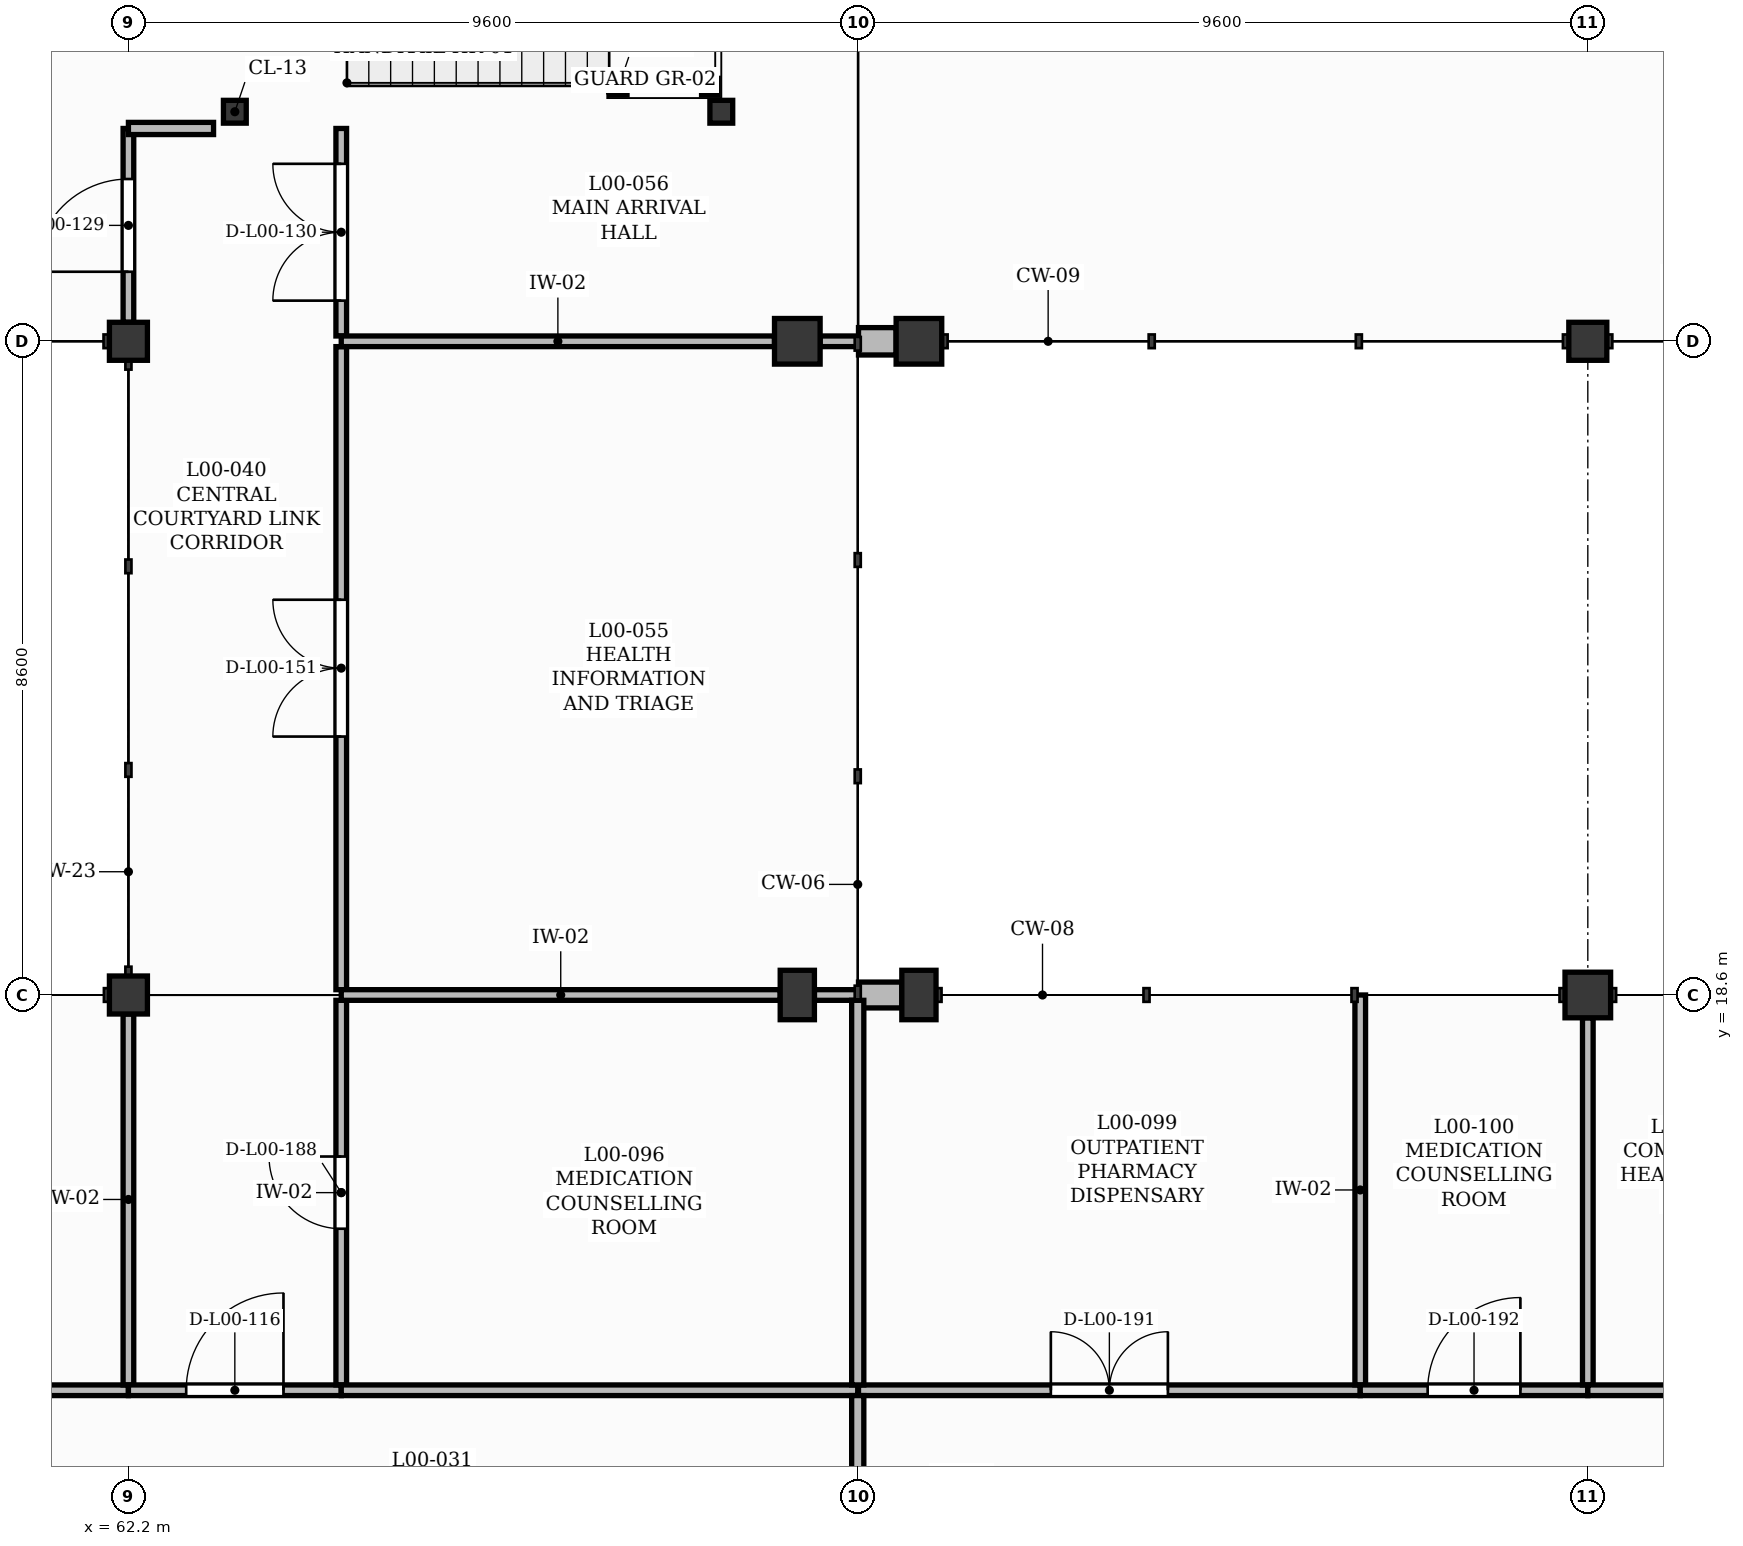
"""IFC4 building model, lengths in metres.
Left out: names, types, materials, properties, quantities, classifications, styles, units other than length and angle.
Written with IfcOpenShell. Run it as: python <this file> out.ifc"""

import sys

from ifc_helpers import new_model, si_unit, direction, frame, frame_2d, origin, origin_2d, place, context, subcontext, project, spatial, rectangle, hollow_circle, i_section, extrude, element, fill, save


model = new_model("IFC4")
c1 = context("Model", 3, precision=1e-05, world=origin(), true_north=direction((0.0, 1.0)))
c2 = subcontext(c1, "Body", "Model", "MODEL_VIEW")
j1 = project(units=[si_unit("LENGTHUNIT", "METRE"), si_unit("PLANEANGLEUNIT", "RADIAN")], contexts=[c1])
p1 = place(None, origin())
s1 = spatial("IfcSite", under=j1, at=p1, CompositionType="ELEMENT")
p2 = place(p1, origin())
s2 = spatial("IfcBuilding", under=s1, at=p2, CompositionType="ELEMENT")
p3 = place(p2, origin())
s3 = spatial("IfcBuildingStorey", under=s2, at=p3, CompositionType="ELEMENT", Elevation=0.0)
p4 = place(p3, frame((72.6, 18.6, 0.0), z_axis=(0.0, 0.0, 1.0), x_axis=(1.0, 0.0, 0.0)))
e1 = element("IfcColumn", 1, at=p4, inside=s3, PredefinedType="COLUMN", context=c2, shape_type="SweptSolid", body=[
    extrude(rectangle(XDim=0.45, YDim=0.65, at=origin_2d()), origin(), (0.0, 0.0, 1.0), 4.2),
])
for number, where, z_axis, x_axis in (
    (2, (72.6, 27.2, 0.0), (0.0, 0.0, 1.0), (1.0, 0.0, 0.0)),
    (3, (81.4, 18.6, 0.0), (0.0, 0.0, 1.0), (1.0, 0.0, 0.0)),
):
    element("IfcColumn", number, at=place(p3, frame(where, z_axis=z_axis, x_axis=x_axis)), inside=s3, PredefinedType="COLUMN", context=c2, shape_type="SweptSolid", body=[
        extrude(rectangle(XDim=0.6, YDim=0.6, at=origin_2d()), origin(), (0.0, 0.0, 1.0), 4.2),
    ])
for number, where, z_axis, x_axis in (
    (4, (81.4, 27.2, 0.0), (0.0, 0.0, 1.0), (1.0, 0.0, 0.0)),
    (5, (62.2, 18.6, 0.0), (0.0, 0.0, 1.0), (1.0, 0.0, 0.0)),
    (6, (62.2, 27.2, 0.0), (0.0, 0.0, 1.0), (1.0, 0.0, 0.0)),
):
    element("IfcColumn", number, at=place(p3, frame(where, z_axis=z_axis, x_axis=x_axis)), inside=s3, PredefinedType="COLUMN", context=c2, shape_type="SweptSolid", body=[
        extrude(rectangle(XDim=0.5, YDim=0.5, at=origin_2d()), origin(), (0.0, 0.0, 1.0), 4.2),
    ])
p5 = place(p3, frame((71.0, 18.6, 0.0), z_axis=(0.0, 0.0, 1.0), x_axis=(1.0, 0.0, 0.0)))
e7 = element("IfcColumn", 7, at=p5, inside=s3, PredefinedType="COLUMN", context=c2, shape_type="SweptSolid", body=[
    extrude(rectangle(XDim=0.45, YDim=0.65, at=origin_2d()), origin(), (0.0, 0.0, 1.0), 4.2),
])
p6 = place(p3, frame((71.0, 27.2, 0.0), z_axis=(0.0, 0.0, 1.0), x_axis=(1.0, 0.0, 0.0)))
e8 = element("IfcColumn", 8, at=p6, inside=s3, PredefinedType="COLUMN", context=c2, shape_type="SweptSolid", body=[
    extrude(rectangle(XDim=0.6, YDim=0.6, at=origin_2d()), origin(), (0.0, 0.0, 1.0), 4.2),
])
p7 = place(p3, frame((71.805, 18.6, 0.0), z_axis=(0.0, 0.0, 1.0), x_axis=(1.0, 0.0, 0.0)))
e9 = element("IfcWall", 9, at=p7, inside=s3, PredefinedType="SOLIDWALL", context=c2, shape_type="SweptSolid", body=[
    extrude(rectangle(XDim=0.57, YDim=0.34, at=frame_2d((0.285, 0.0))), origin(), (0.0, 0.0, 1.0), 4.2),
])
p8 = place(p3, frame((71.805, 27.2, 0.0), z_axis=(0.0, 0.0, 1.0), x_axis=(1.0, 0.0, 0.0)))
e10 = element("IfcWall", 10, at=p8, inside=s3, PredefinedType="SOLIDWALL", context=c2, shape_type="SweptSolid", body=[
    extrude(rectangle(XDim=0.495, YDim=0.36, at=frame_2d((0.248, 0.0))), origin(), (0.0, 0.0, 1.0), 4.2),
])
for number, where, z_axis, x_axis in (
    (11, (63.6, 30.22, 0.0), (0.0, 0.0, 1.0), (1.0, 0.0, 0.0)),
    (12, (70.0, 30.22, 0.0), (0.0, 0.0, 1.0), (1.0, 0.0, 0.0)),
):
    element("IfcColumn", number, at=place(p3, frame(where, z_axis=z_axis, x_axis=x_axis)), inside=s3, PredefinedType="COLUMN", context=c2, shape_type="SweptSolid", body=[
        extrude(i_section(OverallWidth=0.3, OverallDepth=0.3, WebThickness=0.011, FlangeThickness=0.019, FilletRadius=0.027, at=origin_2d()), origin(), (0.0, 0.0, 1.0), 4.2),
    ])
for number, where, z_axis, x_axis in (
    (13, (68.65, 30.55, 0.0), (0.0, 0.0, 1.0), (1.0, 0.0, 0.0)),
    (14, (69.85, 30.55, 0.0), (0.0, 0.0, 1.0), (1.0, 0.0, 0.0)),
):
    element("IfcColumn", number, at=place(p3, frame(where, z_axis=z_axis, x_axis=x_axis)), inside=s3, PredefinedType="COLUMN", context=c2, shape_type="SweptSolid", body=[
        extrude(hollow_circle(Radius=0.11, WallThickness=0.01, at=origin_2d()), origin(), (0.0, 0.0, 1.0), 2.03),
    ])
p9 = place(p3, frame((57.93, 13.4, 0.0), z_axis=(0.0, 0.0, 1.0), x_axis=(1.0, 0.0, 0.0)))
e15 = element("IfcWall", 15, at=p9, inside=s3, PredefinedType="PARTITIONING", context=c2, shape_type="SweptSolid", body=[
    extrude(rectangle(XDim=4.27, YDim=0.14, at=frame_2d((2.135, 0.0))), origin(), (0.0, 0.0, 1.0), 4.18),
])
p10 = place(p9, frame((1.525, 0.0, 0.0)))
e16 = element("IfcOpeningElement", 16, at=p10, cuts=e15, PredefinedType="OPENING", context=c2, shape_type="SweptSolid", body=[
    extrude(rectangle(XDim=1.22, YDim=2.1, at=frame_2d((0.61, 1.05))), frame((0.0, 0.08, 0.0), z_axis=(0.0, -1.0, 0.0), x_axis=(1.0, 0.0, 0.0)), (0.0, 0.0, 1.0), 0.16),
])
p11 = place(p3, frame((62.2, 13.47, 0.0), z_axis=(0.0, 0.0, 1.0), x_axis=(0.0, 1.0, 0.0)))
e17 = element("IfcWall", 17, at=p11, inside=s3, PredefinedType="PARTITIONING", context=c2, shape_type="SweptSolid", body=[
    extrude(rectangle(XDim=4.88, YDim=0.14, at=frame_2d((2.44, 0.0))), origin(), (0.0, 0.0, 1.0), 3.5),
])
p12 = place(p3, frame((62.2, 13.4, 0.0), z_axis=(0.0, 0.0, 1.0), x_axis=(1.0, 0.0, 0.0)))
e18 = element("IfcWall", 18, at=p12, inside=s3, PredefinedType="PARTITIONING", context=c2, shape_type="SweptSolid", body=[
    extrude(rectangle(XDim=2.8, YDim=0.14, at=frame_2d((1.4, 0.0))), origin(), (0.0, 0.0, 1.0), 4.18),
])
p13 = place(p12, frame((0.76, 0.0, 0.0)))
e19 = element("IfcOpeningElement", 19, at=p13, cuts=e18, PredefinedType="OPENING", context=c2, shape_type="SweptSolid", body=[
    extrude(rectangle(XDim=1.28, YDim=2.2, at=frame_2d((0.64, 1.1))), frame((0.0, 0.08, 0.0), z_axis=(0.0, -1.0, 0.0), x_axis=(1.0, 0.0, 0.0)), (0.0, 0.0, 1.0), 0.16),
])
p14 = place(p3, frame((62.2, 27.45, 0.0), z_axis=(0.0, 0.0, 1.0), x_axis=(0.0, 1.0, 0.0)))
e20 = element("IfcWall", 20, at=p14, inside=s3, PredefinedType="PARTITIONING", context=c2, shape_type="SweptSolid", body=[
    extrude(rectangle(XDim=2.55, YDim=0.14, at=frame_2d((1.275, 0.0))), origin(), (0.0, 0.0, 1.0), 3.4),
])
p15 = place(p14, frame((0.665, 0.0, 0.0)))
e21 = element("IfcOpeningElement", 21, at=p15, cuts=e20, PredefinedType="OPENING", context=c2, shape_type="SweptSolid", body=[
    extrude(rectangle(XDim=1.22, YDim=2.1, at=frame_2d((0.61, 1.05))), frame((0.0, 0.08, 0.0), z_axis=(0.0, -1.0, 0.0), x_axis=(1.0, 0.0, 0.0)), (0.0, 0.0, 1.0), 0.16),
])
p16 = place(p3, frame((65.0, 13.47, 0.0), z_axis=(0.0, 0.0, 1.0), x_axis=(0.0, 1.0, 0.0)))
e22 = element("IfcWall", 22, at=p16, inside=s3, PredefinedType="PARTITIONING", context=c2, shape_type="SweptSolid", body=[
    extrude(rectangle(XDim=5.06, YDim=0.14, at=frame_2d((2.53, 0.0))), origin(), (0.0, 0.0, 1.0), 4.18),
])
p17 = place(p16, frame((2.055, 0.0, 0.0)))
e23 = element("IfcOpeningElement", 23, at=p17, cuts=e22, PredefinedType="OPENING", context=c2, shape_type="SweptSolid", body=[
    extrude(rectangle(XDim=0.95, YDim=2.1, at=frame_2d((0.475, 1.05))), frame((0.0, 0.08, 0.0), z_axis=(0.0, -1.0, 0.0), x_axis=(1.0, 0.0, 0.0)), (0.0, 0.0, 1.0), 0.16),
])
p18 = place(p3, frame((65.0, 13.4, 0.0), z_axis=(0.0, 0.0, 1.0), x_axis=(1.0, 0.0, 0.0)))
e24 = element("IfcWall", 24, at=p18, inside=s3, PredefinedType="PARTITIONING", context=c2, shape_type="SweptSolid", body=[
    extrude(rectangle(XDim=6.795, YDim=0.14, at=frame_2d((3.397, 0.0))), origin(), (0.0, 0.0, 1.0), 4.18),
])
p19 = place(p3, frame((65.0, 18.67, 0.0), z_axis=(0.0, 0.0, 1.0), x_axis=(0.0, 1.0, 0.0)))
e25 = element("IfcWall", 25, at=p19, inside=s3, PredefinedType="PARTITIONING", context=c2, shape_type="SweptSolid", body=[
    extrude(rectangle(XDim=8.46, YDim=0.14, at=frame_2d((4.23, 0.0))), origin(), (0.0, 0.0, 1.0), 4.18),
])
p20 = place(p19, frame((3.33, 0.0, 0.0)))
e26 = element("IfcOpeningElement", 26, at=p20, cuts=e25, PredefinedType="OPENING", context=c2, shape_type="SweptSolid", body=[
    extrude(rectangle(XDim=1.8, YDim=2.3, at=frame_2d((0.9, 1.15))), frame((0.0, 0.08, 0.0), z_axis=(0.0, -1.0, 0.0), x_axis=(1.0, 0.0, 0.0)), (0.0, 0.0, 1.0), 0.16),
])
p21 = place(p3, frame((65.0, 18.6, 0.0), z_axis=(0.0, 0.0, 1.0), x_axis=(1.0, 0.0, 0.0)))
e27 = element("IfcWall", 27, at=p21, inside=s3, PredefinedType="PARTITIONING", context=c2, shape_type="SweptSolid", body=[
    extrude(rectangle(XDim=5.775, YDim=0.14, at=frame_2d((2.887, 0.0))), origin(), (0.0, 0.0, 1.0), 3.15),
])
p22 = place(p3, frame((71.225, 18.6, 0.0), z_axis=(0.0, 0.0, 1.0), x_axis=(1.0, 0.0, 0.0)))
e28 = element("IfcWall", 28, at=p22, inside=s3, PredefinedType="PARTITIONING", context=c2, shape_type="SweptSolid", body=[
    extrude(rectangle(XDim=0.57, YDim=0.14, at=frame_2d((0.285, 0.0))), origin(), (0.0, 0.0, 1.0), 4.18),
])
p23 = place(p3, frame((65.0, 27.27, 0.0), z_axis=(0.0, 0.0, 1.0), x_axis=(0.0, 1.0, 0.0)))
e29 = element("IfcWall", 29, at=p23, inside=s3, PredefinedType="PARTITIONING", context=c2, shape_type="SweptSolid", body=[
    extrude(rectangle(XDim=2.73, YDim=0.14, at=frame_2d((1.365, 0.0))), origin(), (0.0, 0.0, 1.0), 4.18),
])
p24 = place(p23, frame((0.465, 0.0, 0.0)))
e30 = element("IfcOpeningElement", 30, at=p24, cuts=e29, PredefinedType="OPENING", context=c2, shape_type="SweptSolid", body=[
    extrude(rectangle(XDim=1.8, YDim=2.3, at=frame_2d((0.9, 1.15))), frame((0.0, 0.08, 0.0), z_axis=(0.0, -1.0, 0.0), x_axis=(1.0, 0.0, 0.0)), (0.0, 0.0, 1.0), 0.16),
])
p25 = place(p3, frame((65.0, 27.2, 0.0), z_axis=(0.0, 0.0, 1.0), x_axis=(1.0, 0.0, 0.0)))
e31 = element("IfcWall", 31, at=p25, inside=s3, PredefinedType="PARTITIONING", context=c2, shape_type="SweptSolid", body=[
    extrude(rectangle(XDim=5.7, YDim=0.14, at=frame_2d((2.85, 0.0))), origin(), (0.0, 0.0, 1.0), 3.4),
])
p26 = place(p3, frame((71.3, 27.2, 0.0), z_axis=(0.0, 0.0, 1.0), x_axis=(1.0, 0.0, 0.0)))
e32 = element("IfcWall", 32, at=p26, inside=s3, PredefinedType="PARTITIONING", context=c2, shape_type="SweptSolid", body=[
    extrude(rectangle(XDim=0.495, YDim=0.14, at=frame_2d((0.248, 0.0))), origin(), (0.0, 0.0, 1.0), 4.18),
])
p27 = place(p3, frame((71.805, 13.4, 0.0), z_axis=(0.0, 0.0, 1.0), x_axis=(1.0, 0.0, 0.0)))
e33 = element("IfcWall", 33, at=p27, inside=s3, PredefinedType="PARTITIONING", context=c2, shape_type="SweptSolid", body=[
    extrude(rectangle(XDim=6.601, YDim=0.14, at=frame_2d((3.301, 0.0))), origin(), (0.0, 0.0, 1.0), 4.18),
])
p28 = place(p27, frame((2.531, 0.0, 0.0)))
e34 = element("IfcOpeningElement", 34, at=p28, cuts=e33, PredefinedType="OPENING", context=c2, shape_type="SweptSolid", body=[
    extrude(rectangle(XDim=1.54, YDim=2.25, at=frame_2d((0.77, 1.125))), frame((0.0, 0.08, 0.0), z_axis=(0.0, -1.0, 0.0), x_axis=(1.0, 0.0, 0.0)), (0.0, 0.0, 1.0), 0.16),
])
p29 = place(p3, frame((78.406, 13.47, 0.0), z_axis=(0.0, 0.0, 1.0), x_axis=(0.0, 1.0, 0.0)))
e35 = element("IfcWall", 35, at=p29, inside=s3, PredefinedType="PARTITIONING", context=c2, shape_type="SweptSolid", body=[
    extrude(rectangle(XDim=5.13, YDim=0.14, at=frame_2d((2.565, 0.0))), origin(), (0.0, 0.0, 1.0), 4.18),
])
p30 = place(p3, frame((78.406, 13.4, 0.0), z_axis=(0.0, 0.0, 1.0), x_axis=(1.0, 0.0, 0.0)))
e36 = element("IfcWall", 36, at=p30, inside=s3, PredefinedType="PARTITIONING", context=c2, shape_type="SweptSolid", body=[
    extrude(rectangle(XDim=2.994, YDim=0.14, at=frame_2d((1.497, 0.0))), origin(), (0.0, 0.0, 1.0), 4.18),
])
p31 = place(p30, frame((0.887, 0.0, 0.0)))
e37 = element("IfcOpeningElement", 37, at=p31, cuts=e36, PredefinedType="OPENING", context=c2, shape_type="SweptSolid", body=[
    extrude(rectangle(XDim=1.22, YDim=2.1, at=frame_2d((0.61, 1.05))), frame((0.0, 0.08, 0.0), z_axis=(0.0, -1.0, 0.0), x_axis=(1.0, 0.0, 0.0)), (0.0, 0.0, 1.0), 0.16),
])
p32 = place(p3, frame((81.4, 13.47, 0.0), z_axis=(0.0, 0.0, 1.0), x_axis=(0.0, 1.0, 0.0)))
e38 = element("IfcWall", 38, at=p32, inside=s3, PredefinedType="PARTITIONING", context=c2, shape_type="SweptSolid", body=[
    extrude(rectangle(XDim=4.83, YDim=0.14, at=frame_2d((2.415, 0.0))), origin(), (0.0, 0.0, 1.0), 3.5),
])
p33 = place(p3, frame((81.4, 13.4, 0.0), z_axis=(0.0, 0.0, 1.0), x_axis=(1.0, 0.0, 0.0)))
e39 = element("IfcWall", 39, at=p33, inside=s3, PredefinedType="PARTITIONING", context=c2, shape_type="SweptSolid", body=[
    extrude(rectangle(XDim=3.821, YDim=0.14, at=frame_2d((1.911, 0.0))), origin(), (0.0, 0.0, 1.0), 4.18),
])
p34 = place(p33, frame((1.42, 0.0, 0.0)))
e40 = element("IfcOpeningElement", 40, at=p34, cuts=e39, PredefinedType="OPENING", context=c2, shape_type="SweptSolid", body=[
    extrude(rectangle(XDim=0.98, YDim=2.15, at=frame_2d((0.49, 1.075))), frame((0.0, 0.08, 0.0), z_axis=(0.0, -1.0, 0.0), x_axis=(1.0, 0.0, 0.0)), (0.0, 0.0, 1.0), 0.16),
])
p35 = place(p3, frame((71.795, 10.87, 0.0), z_axis=(0.0, 0.0, 1.0), x_axis=(0.0, 1.0, 0.0)))
e41 = element("IfcWall", 41, at=p35, inside=s3, PredefinedType="PARTITIONING", context=c2, shape_type="SweptSolid", body=[
    extrude(rectangle(XDim=2.46, YDim=0.16, at=frame_2d((1.23, 0.0))), origin(), (0.0, 0.0, 1.0), 4.18),
])
p36 = place(p3, frame((63.32, 30.0, 0.0), z_axis=(0.0, 0.0, 1.0), x_axis=(-1.0, 0.0, 0.0)))
e42 = element("IfcWall", 42, at=p36, inside=s3, PredefinedType="PARTITIONING", context=c2, shape_type="SweptSolid", body=[
    extrude(rectangle(XDim=1.12, YDim=0.16, at=frame_2d((0.56, 0.0))), origin(), (0.0, 0.0, 1.0), 4.18),
])
p37 = place(p3, frame((71.795, 13.47, 0.0), z_axis=(0.0, 0.0, 1.0), x_axis=(0.0, 1.0, 0.0)))
e43 = element("IfcWall", 43, at=p37, inside=s3, PredefinedType="PARTITIONING", context=c2, shape_type="SweptSolid", body=[
    extrude(rectangle(XDim=5.06, YDim=0.16, at=frame_2d((2.53, 0.0))), origin(), (0.0, 0.0, 1.0), 4.18),
])
p38 = place(p13, origin())
e44 = element("IfcDoor", 44, at=p38, inside=s3, OperationType="SINGLE_SWING_RIGHT", PredefinedType="DOOR", context=c2, shape_type="SweptSolid", body=[
    extrude(rectangle(XDim=1.28, YDim=2.2, at=frame_2d((0.64, 1.1))), frame((0.0, 0.025, 0.0), z_axis=(0.0, -1.0, 0.0), x_axis=(1.0, 0.0, 0.0)), (0.0, 0.0, 1.0), 0.05),
])
fill(e19, e44)
p39 = place(p15, origin())
e45 = element("IfcDoor", 45, at=p39, inside=s3, OperationType="SINGLE_SWING_LEFT", PredefinedType="DOOR", context=c2, shape_type="SweptSolid", body=[
    extrude(rectangle(XDim=1.22, YDim=2.1, at=frame_2d((0.61, 1.05))), frame((0.0, 0.025, 0.0), z_axis=(0.0, -1.0, 0.0), x_axis=(1.0, 0.0, 0.0)), (0.0, 0.0, 1.0), 0.05),
])
fill(e21, e45)
p40 = place(p24, origin())
e46 = element("IfcDoor", 46, at=p40, inside=s3, OperationType="DOUBLE_DOOR_SINGLE_SWING", PredefinedType="DOOR", context=c2, shape_type="SweptSolid", body=[
    extrude(rectangle(XDim=1.8, YDim=2.3, at=frame_2d((0.9, 1.15))), frame((0.0, 0.025, 0.0), z_axis=(0.0, -1.0, 0.0), x_axis=(1.0, 0.0, 0.0)), (0.0, 0.0, 1.0), 0.05),
])
fill(e30, e46)
p41 = place(p20, origin())
e47 = element("IfcDoor", 47, at=p41, inside=s3, OperationType="DOUBLE_DOOR_SINGLE_SWING", PredefinedType="DOOR", context=c2, shape_type="SweptSolid", body=[
    extrude(rectangle(XDim=1.8, YDim=2.3, at=frame_2d((0.9, 1.15))), frame((0.0, 0.025, 0.0), z_axis=(0.0, -1.0, 0.0), x_axis=(1.0, 0.0, 0.0)), (0.0, 0.0, 1.0), 0.05),
])
fill(e26, e47)
p42 = place(p17, origin())
e48 = element("IfcDoor", 48, at=p42, inside=s3, OperationType="SINGLE_SWING_RIGHT", PredefinedType="DOOR", context=c2, shape_type="SweptSolid", body=[
    extrude(rectangle(XDim=0.95, YDim=2.1, at=frame_2d((0.475, 1.05))), frame((0.0, 0.025, 0.0), z_axis=(0.0, -1.0, 0.0), x_axis=(1.0, 0.0, 0.0)), (0.0, 0.0, 1.0), 0.05),
])
fill(e23, e48)
p43 = place(p28, origin())
e49 = element("IfcDoor", 49, at=p43, inside=s3, OperationType="DOUBLE_DOOR_SINGLE_SWING", PredefinedType="DOOR", context=c2, shape_type="SweptSolid", body=[
    extrude(rectangle(XDim=1.54, YDim=2.25, at=frame_2d((0.77, 1.125))), frame((0.0, 0.025, 0.0), z_axis=(0.0, -1.0, 0.0), x_axis=(1.0, 0.0, 0.0)), (0.0, 0.0, 1.0), 0.05),
])
fill(e34, e49)
p44 = place(p31, origin())
e50 = element("IfcDoor", 50, at=p44, inside=s3, OperationType="SINGLE_SWING_RIGHT", PredefinedType="DOOR", context=c2, shape_type="SweptSolid", body=[
    extrude(rectangle(XDim=1.22, YDim=2.1, at=frame_2d((0.61, 1.05))), frame((0.0, 0.025, 0.0), z_axis=(0.0, -1.0, 0.0), x_axis=(1.0, 0.0, 0.0)), (0.0, 0.0, 1.0), 0.05),
])
fill(e37, e50)
save(model, sys.argv[1])
